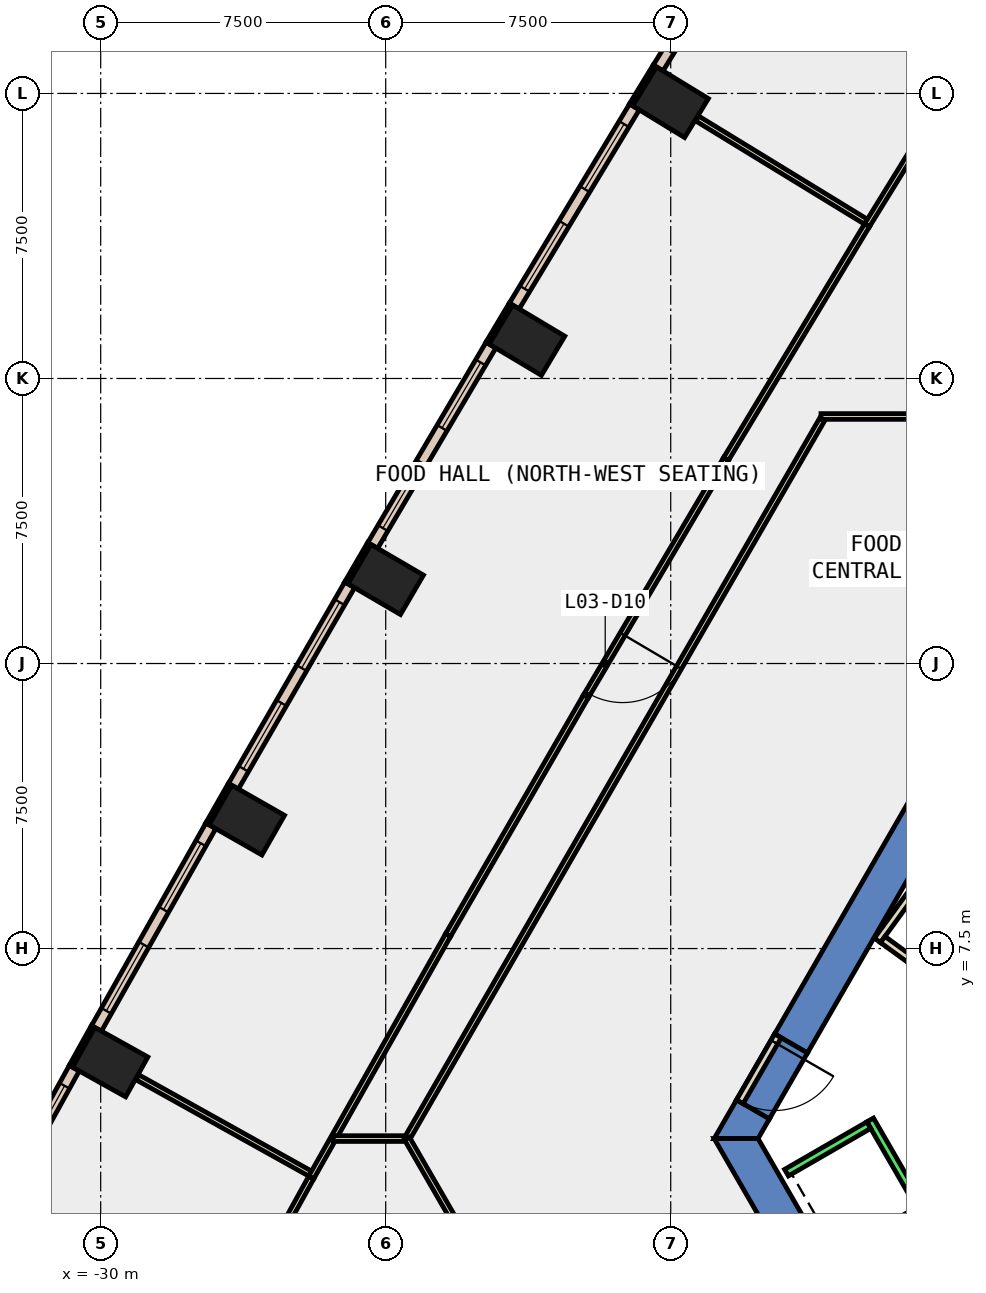
"""IFC4 building model, lengths in metres.
Left out: names, types, materials, properties, quantities, classifications, styles, units other than length and angle.
Written with IfcOpenShell. Run it as: python <this file> out.ifc"""

import sys

from ifc_helpers import new_model, si_unit, direction, frame, frame_2d, origin, origin_2d, place, context, subcontext, project, spatial, polyline, rectangle, outline, extrude, element, fill, save


model = new_model("IFC4")
c1 = context("Model", 3, precision=1e-05, world=origin(), true_north=direction((0.0, 1.0)))
c2 = subcontext(c1, "Body", "Model", "MODEL_VIEW")
j1 = project(units=[si_unit("LENGTHUNIT", "METRE"), si_unit("PLANEANGLEUNIT", "RADIAN")], contexts=[c1])
p1 = place(None, origin())
s1 = spatial("IfcSite", under=j1, at=p1, CompositionType="ELEMENT")
p2 = place(p1, origin())
s2 = spatial("IfcBuilding", under=s1, at=p2, CompositionType="ELEMENT")
p3 = place(p2, frame((0.0, 0.0, 20.0)))
s3 = spatial("IfcBuildingStorey", under=s2, at=p3, CompositionType="ELEMENT", Elevation=20.0)
for number, where, z_axis, x_axis in (
    (1, (-15.005, 29.769, -0.45), (0.0, 0.0, 1.0), (0.522, 0.853, 0.0)),
    (2, (-18.782, 23.508, -0.45), (0.0, 0.0, 1.0), (0.513, 0.858, 0.0)),
    (3, (-22.5, 17.211, -0.45), (0.0, 0.0, 1.0), (0.504, 0.864, 0.0)),
    (4, (-26.155, 10.88, -0.45), (0.0, 0.0, 1.0), (0.496, 0.869, 0.0)),
    (5, (-29.75, 4.512, -0.45), (0.0, 0.0, 1.0), (0.487, 0.873, 0.0)),
):
    element("IfcColumn", number, at=place(p3, frame(where, z_axis=z_axis, x_axis=x_axis)), inside=s3, PredefinedType="COLUMN", context=c2, shape_type="SweptSolid", body=[
        extrude(rectangle(XDim=1.2, YDim=1.6, at=origin_2d()), origin(), (0.0, 0.0, 1.0), 5.0),
    ])
p4 = place(p3, frame((0.0, 0.0, -0.45)))
e6 = element("IfcWall", 6, at=p4, inside=s3, PredefinedType="SHEAR", context=c2, shape_type="SweptSolid", body=[
    extrude(outline(polyline([(-12.267, 5.252), (-11.402, 4.752), (-6.351, 13.5), (-6.928, 14.5), (-12.267, 5.252)])), origin(), (0.0, 0.0, 1.0), 5.0),
])
p5 = place(p3, frame((0.0, 0.0, -0.45)))
e7 = element("IfcWall", 7, at=p5, inside=s3, PredefinedType="SHEAR", context=c2, shape_type="SweptSolid", body=[
    extrude(outline(polyline([(-12.402, 3.02), (-13.267, 3.52), (-13.856, 2.5), (-12.702, 2.5), (-12.402, 3.02)])), origin(), (0.0, 0.0, 1.0), 5.0),
])
p6 = place(p3, frame((0.0, 0.0, 3.6)))
e8 = element("IfcWall", 8, at=p6, inside=s3, PredefinedType="SHEAR", context=c2, shape_type="SweptSolid", body=[
    extrude(outline(polyline([(-13.267, 3.52), (-12.402, 3.02), (-11.402, 4.752), (-12.267, 5.252), (-13.267, 3.52)])), origin(), (0.0, 0.0, 1.0), 0.95),
])
p7 = place(p3, frame((0.0, 0.0, -0.45)))
e9 = element("IfcWall", 9, at=p7, inside=s3, PredefinedType="SHEAR", context=c2, shape_type="SweptSolid", body=[
    extrude(outline(polyline([(-13.856, 2.5), (-6.928, -9.5), (-6.351, -8.5), (-12.702, 2.5), (-13.856, 2.5)])), origin(), (0.0, 0.0, 1.0), 5.0),
])
p8 = place(p3, frame((-15.417, 30.724, 0.0), z_axis=(0.0, 0.0, 1.0), x_axis=(-0.521507599072, -0.853246637327, 0.0)))
e10 = element("IfcWall", 10, at=p8, inside=s3, PredefinedType="STANDARD", context=c2, shape_type="SweptSolid", body=[
    extrude(rectangle(XDim=1.2, YDim=0.1, at=frame_2d((0.6, 0.0))), origin(), (0.0, 0.0, 1.0), 4.55),
])
p9 = place(p3, frame((-19.204, 24.459, 0.0), z_axis=(0.0, 0.0, 1.0), x_axis=(-0.513238760752, -0.858245870635, 0.0)))
e11 = element("IfcWall", 11, at=p9, inside=s3, PredefinedType="STANDARD", context=c2, shape_type="SweptSolid", body=[
    extrude(rectangle(XDim=1.2, YDim=0.1, at=frame_2d((0.6, 0.0))), origin(), (0.0, 0.0, 1.0), 4.55),
])
p10 = place(p3, frame((-22.931, 18.158, 0.0), z_axis=(0.0, 0.0, 1.0), x_axis=(-0.504313844903, -0.863520437418, 0.0)))
e12 = element("IfcWall", 12, at=p10, inside=s3, PredefinedType="STANDARD", context=c2, shape_type="SweptSolid", body=[
    extrude(rectangle(XDim=1.2, YDim=0.1, at=frame_2d((0.6, 0.0))), origin(), (0.0, 0.0, 1.0), 4.55),
])
p11 = place(p3, frame((-26.596, 11.822, 0.0), z_axis=(0.0, 0.0, 1.0), x_axis=(-0.495854054996, -0.868405870629, 0.0)))
e13 = element("IfcWall", 13, at=p11, inside=s3, PredefinedType="STANDARD", context=c2, shape_type="SweptSolid", body=[
    extrude(rectangle(XDim=1.2, YDim=0.1, at=frame_2d((0.6, 0.0))), origin(), (0.0, 0.0, 1.0), 4.55),
])
p12 = place(p3, frame((-30.2, 5.45, 0.0), z_axis=(0.0, 0.0, 1.0), x_axis=(-0.486817526853, -0.873503689488, 0.0)))
e14 = element("IfcWall", 14, at=p12, inside=s3, PredefinedType="STANDARD", context=c2, shape_type="SweptSolid", body=[
    extrude(rectangle(XDim=1.2, YDim=0.1, at=frame_2d((0.6, 0.0))), origin(), (0.0, 0.0, 1.0), 4.55),
])
p13 = place(p3, frame((-12.117, 35.881, 0.0), z_axis=(0.0, 0.0, 1.0), x_axis=(-0.524953701886, -0.85113078365, 0.0)))
e15 = element("IfcWall", 15, at=p13, inside=s3, PredefinedType="STANDARD", context=c2, shape_type="SweptSolid", body=[
    extrude(rectangle(XDim=6.123, YDim=0.3, at=frame_2d((3.061, 0.0))), origin(), (0.0, 0.0, 1.0), 4.55),
])
p14 = place(p13, frame((0.531, 0.0, 1.0)))
e16 = element("IfcOpeningElement", 16, at=p14, cuts=e15, PredefinedType="OPENING", context=c2, shape_type="SweptSolid", body=[
    extrude(rectangle(XDim=2.0, YDim=3.2, at=frame_2d((1.0, 1.6))), frame((0.0, 0.16, 0.0), z_axis=(0.0, -1.0, 0.0), x_axis=(1.0, 0.0, 0.0)), (0.0, 0.0, 1.0), 0.32),
])
p15 = place(p13, frame((3.592, 0.0, 1.0)))
e17 = element("IfcOpeningElement", 17, at=p15, cuts=e15, PredefinedType="OPENING", context=c2, shape_type="SweptSolid", body=[
    extrude(rectangle(XDim=2.0, YDim=3.2, at=frame_2d((1.0, 1.6))), frame((0.0, 0.16, 0.0), z_axis=(0.0, -1.0, 0.0), x_axis=(1.0, 0.0, 0.0)), (0.0, 0.0, 1.0), 0.32),
])
p16 = place(p3, frame((-15.954, 29.647, 0.0), z_axis=(0.0, 0.0, 1.0), x_axis=(-0.516687651362, -0.85617397235, 0.0)))
e18 = element("IfcWall", 18, at=p16, inside=s3, PredefinedType="STANDARD", context=c2, shape_type="SweptSolid", body=[
    extrude(rectangle(XDim=6.121, YDim=0.3, at=frame_2d((3.061, 0.0))), origin(), (0.0, 0.0, 1.0), 4.55),
])
p17 = place(p16, frame((0.53, 0.0, 1.0)))
e19 = element("IfcOpeningElement", 19, at=p17, cuts=e18, PredefinedType="OPENING", context=c2, shape_type="SweptSolid", body=[
    extrude(rectangle(XDim=2.0, YDim=3.2, at=frame_2d((1.0, 1.6))), frame((0.0, 0.16, 0.0), z_axis=(0.0, -1.0, 0.0), x_axis=(1.0, 0.0, 0.0)), (0.0, 0.0, 1.0), 0.32),
])
p18 = place(p16, frame((3.591, 0.0, 1.0)))
e20 = element("IfcOpeningElement", 20, at=p18, cuts=e18, PredefinedType="OPENING", context=c2, shape_type="SweptSolid", body=[
    extrude(rectangle(XDim=2.0, YDim=3.2, at=frame_2d((1.0, 1.6))), frame((0.0, 0.16, 0.0), z_axis=(0.0, -1.0, 0.0), x_axis=(1.0, 0.0, 0.0)), (0.0, 0.0, 1.0), 0.32),
])
p19 = place(p3, frame((-19.731, 23.377, 0.0), z_axis=(0.0, 0.0, 1.0), x_axis=(-0.50834231483, -0.861155091115, 0.0)))
e21 = element("IfcWall", 21, at=p19, inside=s3, PredefinedType="STANDARD", context=c2, shape_type="SweptSolid", body=[
    extrude(rectangle(XDim=6.122, YDim=0.3, at=frame_2d((3.061, 0.0))), origin(), (0.0, 0.0, 1.0), 4.55),
])
p20 = place(p19, frame((0.53, 0.0, 1.0)))
e22 = element("IfcOpeningElement", 22, at=p20, cuts=e21, PredefinedType="OPENING", context=c2, shape_type="SweptSolid", body=[
    extrude(rectangle(XDim=2.0, YDim=3.2, at=frame_2d((1.0, 1.6))), frame((0.0, 0.16, 0.0), z_axis=(0.0, -1.0, 0.0), x_axis=(1.0, 0.0, 0.0)), (0.0, 0.0, 1.0), 0.32),
])
p21 = place(p19, frame((3.591, 0.0, 1.0)))
e23 = element("IfcOpeningElement", 23, at=p21, cuts=e21, PredefinedType="OPENING", context=c2, shape_type="SweptSolid", body=[
    extrude(rectangle(XDim=2.0, YDim=3.2, at=frame_2d((1.0, 1.6))), frame((0.0, 0.16, 0.0), z_axis=(0.0, -1.0, 0.0), x_axis=(1.0, 0.0, 0.0)), (0.0, 0.0, 1.0), 0.32),
])
p22 = place(p3, frame((-23.447, 17.071, 0.0), z_axis=(0.0, 0.0, 1.0), x_axis=(-0.499939977436, -0.866060055055, 0.0)))
e24 = element("IfcWall", 24, at=p22, inside=s3, PredefinedType="STANDARD", context=c2, shape_type="SweptSolid", body=[
    extrude(rectangle(XDim=6.121, YDim=0.3, at=frame_2d((3.061, 0.0))), origin(), (0.0, 0.0, 1.0), 4.55),
])
p23 = place(p22, frame((0.53, 0.0, 1.0)))
e25 = element("IfcOpeningElement", 25, at=p23, cuts=e24, PredefinedType="OPENING", context=c2, shape_type="SweptSolid", body=[
    extrude(rectangle(XDim=2.0, YDim=3.2, at=frame_2d((1.0, 1.6))), frame((0.0, 0.16, 0.0), z_axis=(0.0, -1.0, 0.0), x_axis=(1.0, 0.0, 0.0)), (0.0, 0.0, 1.0), 0.32),
])
p24 = place(p22, frame((3.591, 0.0, 1.0)))
e26 = element("IfcOpeningElement", 26, at=p24, cuts=e24, PredefinedType="OPENING", context=c2, shape_type="SweptSolid", body=[
    extrude(rectangle(XDim=2.0, YDim=3.2, at=frame_2d((1.0, 1.6))), frame((0.0, 0.16, 0.0), z_axis=(0.0, -1.0, 0.0), x_axis=(1.0, 0.0, 0.0)), (0.0, 0.0, 1.0), 0.32),
])
p25 = place(p3, frame((-27.101, 10.73, 0.0), z_axis=(0.0, 0.0, 1.0), x_axis=(-0.491661677717, -0.870786308267, 0.0)))
e27 = element("IfcWall", 27, at=p25, inside=s3, PredefinedType="STANDARD", context=c2, shape_type="SweptSolid", body=[
    extrude(rectangle(XDim=6.122, YDim=0.3, at=frame_2d((3.061, 0.0))), origin(), (0.0, 0.0, 1.0), 4.55),
])
p26 = place(p25, frame((0.531, 0.0, 1.0)))
e28 = element("IfcOpeningElement", 28, at=p26, cuts=e27, PredefinedType="OPENING", context=c2, shape_type="SweptSolid", body=[
    extrude(rectangle(XDim=2.0, YDim=3.2, at=frame_2d((1.0, 1.6))), frame((0.0, 0.16, 0.0), z_axis=(0.0, -1.0, 0.0), x_axis=(1.0, 0.0, 0.0)), (0.0, 0.0, 1.0), 0.32),
])
p27 = place(p25, frame((3.592, 0.0, 1.0)))
e29 = element("IfcOpeningElement", 29, at=p27, cuts=e27, PredefinedType="OPENING", context=c2, shape_type="SweptSolid", body=[
    extrude(rectangle(XDim=2.0, YDim=3.2, at=frame_2d((1.0, 1.6))), frame((0.0, 0.16, 0.0), z_axis=(0.0, -1.0, 0.0), x_axis=(1.0, 0.0, 0.0)), (0.0, 0.0, 1.0), 0.32),
])
p28 = place(p3, frame((-30.694, 4.353, 0.0), z_axis=(0.0, 0.0, 1.0), x_axis=(-0.483233380559, -0.875491576152, 0.0)))
e30 = element("IfcWall", 30, at=p28, inside=s3, PredefinedType="STANDARD", context=c2, shape_type="SweptSolid", body=[
    extrude(rectangle(XDim=6.121, YDim=0.3, at=frame_2d((3.061, 0.0))), origin(), (0.0, 0.0, 1.0), 4.55),
])
p29 = place(p28, frame((0.53, 0.0, 1.0)))
e31 = element("IfcOpeningElement", 31, at=p29, cuts=e30, PredefinedType="OPENING", context=c2, shape_type="SweptSolid", body=[
    extrude(rectangle(XDim=2.0, YDim=3.2, at=frame_2d((1.0, 1.6))), frame((0.0, 0.16, 0.0), z_axis=(0.0, -1.0, 0.0), x_axis=(1.0, 0.0, 0.0)), (0.0, 0.0, 1.0), 0.32),
])
p30 = place(p28, frame((3.591, 0.0, 1.0)))
e32 = element("IfcOpeningElement", 32, at=p30, cuts=e30, PredefinedType="OPENING", context=c2, shape_type="SweptSolid", body=[
    extrude(rectangle(XDim=2.0, YDim=3.2, at=frame_2d((1.0, 1.6))), frame((0.0, 0.16, 0.0), z_axis=(0.0, -1.0, 0.0), x_axis=(1.0, 0.0, 0.0)), (0.0, 0.0, 1.0), 0.32),
])
p31 = place(p3, frame((-7.915, 9.981, 0.0), z_axis=(0.0, 0.0, 1.0), x_axis=(-0.587497525331, -0.809225962096, 0.0)))
e33 = element("IfcWall", 33, at=p31, inside=s3, PredefinedType="PARTITIONING", context=c2, shape_type="SweptSolid", body=[
    extrude(rectangle(XDim=2.8, YDim=0.2, at=frame_2d((1.4, 0.0))), origin(), (0.0, 0.0, 1.0), 4.55),
])
p32 = place(p3, frame((-9.421, 7.738, 0.0), z_axis=(0.0, 0.0, 1.0), x_axis=(0.808832031072, -0.588039748242, 0.0)))
e34 = element("IfcWall", 34, at=p32, inside=s3, PredefinedType="PARTITIONING", context=c2, shape_type="SweptSolid", body=[
    extrude(rectangle(XDim=2.2, YDim=0.2, at=frame_2d((1.1, 0.0))), origin(), (0.0, 0.0, 1.0), 4.55),
])
p33 = place(p3, frame((-9.801, 26.587, 0.0), z_axis=(0.0, 0.0, 1.0), x_axis=(-0.853133190526, 0.521693165781, 0.0)))
e35 = element("IfcWall", 35, at=p33, inside=s3, PredefinedType="PARTITIONING", context=c2, shape_type="SweptSolid", body=[
    extrude(rectangle(XDim=5.279, YDim=0.15, at=frame_2d((2.64, 0.0))), origin(), (0.0, 0.0, 1.0), 4.55),
])
p34 = place(p3, frame((-5.99, 32.767, 0.0), z_axis=(0.0, 0.0, 1.0), x_axis=(-0.524805430661, -0.851222215376, 0.0)))
e36 = element("IfcWall", 36, at=p34, inside=s3, PredefinedType="PARTITIONING", context=c2, shape_type="SweptSolid", body=[
    extrude(rectangle(XDim=7.328, YDim=0.15, at=frame_2d((3.664, 0.0))), origin(), (0.0, 0.0, 1.0), 4.55),
])
p35 = place(p3, frame((-24.422, 1.542, 0.0), z_axis=(0.0, 0.0, 1.0), x_axis=(-0.873438758077, 0.48693401595, 0.0)))
e37 = element("IfcWall", 37, at=p35, inside=s3, PredefinedType="PARTITIONING", context=c2, shape_type="SweptSolid", body=[
    extrude(rectangle(XDim=5.28, YDim=0.15, at=frame_2d((2.64, 0.0))), origin(), (0.0, 0.0, 1.0), 4.55),
])
p36 = place(p3, frame((-9.836, 26.529, 0.0), z_axis=(0.0, 0.0, 1.0), x_axis=(-0.516524835149, -0.856272208281, 0.0)))
e38 = element("IfcWall", 38, at=p36, inside=s3, PredefinedType="PARTITIONING", context=c2, shape_type="SweptSolid", body=[
    extrude(rectangle(XDim=7.179, YDim=0.15, at=frame_2d((3.589, 0.0))), origin(), (0.0, 0.0, 1.0), 4.55),
])
p37 = place(p3, frame((-13.544, 20.382, 0.0), z_axis=(0.0, 0.0, 1.0), x_axis=(-0.508434454558, -0.861100694122, 0.0)))
e39 = element("IfcWall", 39, at=p37, inside=s3, PredefinedType="PARTITIONING", context=c2, shape_type="SweptSolid", body=[
    extrude(rectangle(XDim=7.254, YDim=0.15, at=frame_2d((3.627, 0.0))), origin(), (0.0, 0.0, 1.0), 4.55),
])
p38 = place(p37, frame((5.354, 0.0, 0.0)))
e40 = element("IfcOpeningElement", 40, at=p38, cuts=e39, PredefinedType="OPENING", context=c2, shape_type="SweptSolid", body=[
    extrude(rectangle(XDim=1.8, YDim=2.1, at=frame_2d((0.9, 1.05))), frame((0.0, 0.085, 0.0), z_axis=(0.0, -1.0, 0.0), x_axis=(1.0, 0.0, 0.0)), (0.0, 0.0, 1.0), 0.17),
])
p39 = place(p3, frame((-17.232, 14.136, 0.0), z_axis=(0.0, 0.0, 1.0), x_axis=(-0.499962371685, -0.866047127413, 0.0)))
e41 = element("IfcWall", 41, at=p39, inside=s3, PredefinedType="PARTITIONING", context=c2, shape_type="SweptSolid", body=[
    extrude(rectangle(XDim=7.252, YDim=0.15, at=frame_2d((3.626, 0.0))), origin(), (0.0, 0.0, 1.0), 4.55),
])
p40 = place(p3, frame((-20.858, 7.855, 0.0), z_axis=(0.0, 0.0, 1.0), x_axis=(-0.491659598838, -0.870787482036, 0.0)))
e42 = element("IfcWall", 42, at=p40, inside=s3, PredefinedType="PARTITIONING", context=c2, shape_type="SweptSolid", body=[
    extrude(rectangle(XDim=7.324, YDim=0.15, at=frame_2d((3.662, 0.0))), origin(), (0.0, 0.0, 1.0), 4.55),
])
p41 = place(p3, frame((-24.458, 1.477, 0.0), z_axis=(0.0, 0.0, 1.0), x_axis=(-0.483150131412, -0.875537520907, 0.0)))
e43 = element("IfcWall", 43, at=p41, inside=s3, PredefinedType="PARTITIONING", context=c2, shape_type="SweptSolid", body=[
    extrude(rectangle(XDim=7.182, YDim=0.15, at=frame_2d((3.591, 0.0))), origin(), (0.0, 0.0, 1.0), 4.55),
])
p42 = place(p3, frame((-21.976, 2.435, 0.0), z_axis=(0.0, 0.0, 1.0), x_axis=(0.499977403953, 0.866038449225, 0.0)))
e44 = element("IfcWall", 44, at=p42, inside=s3, PredefinedType="PARTITIONING", context=c2, shape_type="SweptSolid", body=[
    extrude(rectangle(XDim=21.939, YDim=0.15, at=frame_2d((10.969, 0.0))), origin(), (0.0, 0.0, 1.0), 4.55),
])
p43 = place(p3, frame((-11.045, 21.5, 0.0), z_axis=(0.0, 0.0, 1.0), x_axis=(1.0, 0.0, 0.0)))
e45 = element("IfcWall", 45, at=p43, inside=s3, PredefinedType="PARTITIONING", context=c2, shape_type="SweptSolid", body=[
    extrude(rectangle(XDim=10.645, YDim=0.15, at=frame_2d((5.323, 0.0))), origin(), (0.0, 0.0, 1.0), 4.55),
])
p44 = place(p3, frame((-23.881, 2.5, 0.0), z_axis=(0.0, 0.0, 1.0), x_axis=(1.0, 0.0, 0.0)))
e46 = element("IfcWall", 46, at=p44, inside=s3, PredefinedType="PARTITIONING", context=c2, shape_type="SweptSolid", body=[
    extrude(rectangle(XDim=1.867, YDim=0.15, at=frame_2d((0.934, 0.0))), origin(), (0.0, 0.0, 1.0), 4.55),
])
p45 = place(p3, frame((-12.18, 5.202, 0.0), z_axis=(0.0, 0.0, 1.0), x_axis=(-0.50002537861, -0.866010750942, 0.0)))
e47 = element("IfcWall", 47, at=p45, inside=s3, PredefinedType="PARTITIONING", context=c2, shape_type="SweptSolid", body=[
    extrude(rectangle(XDim=2.0, YDim=0.2, at=frame_2d((1.0, 0.0))), origin(), (0.0, 0.0, 1.0), 2.4),
])
p46 = place(p45, frame((0.19, 0.0, 0.0)))
e48 = element("IfcOpeningElement", 48, at=p46, cuts=e47, PredefinedType="OPENING", context=c2, shape_type="SweptSolid", body=[
    extrude(rectangle(XDim=1.8, YDim=2.1, at=frame_2d((0.9, 1.05))), frame((0.0, 0.11, 0.0), z_axis=(0.0, -1.0, 0.0), x_axis=(1.0, 0.0, 0.0)), (0.0, 0.0, 1.0), 0.22),
])
p47 = place(p3, frame((-15.572, -8.529, 0.0), z_axis=(0.0, 0.0, 1.0), x_axis=(-0.499959763273, 0.866048633224, 0.0)))
e49 = element("IfcWall", 49, at=p47, inside=s3, PredefinedType="PARTITIONING", context=c2, shape_type="SweptSolid", body=[
    extrude(rectangle(XDim=12.735, YDim=0.15, at=frame_2d((6.367, 0.0))), origin(), (0.0, 0.0, 1.0), 4.55),
])
p48 = place(p3, frame((-9.751, 2.99, 0.0), z_axis=(0.0, 0.0, 1.0), x_axis=(0.50000090737, -0.866024879913, 0.0)))
e50 = element("IfcWall", 50, at=p48, inside=s3, PredefinedType="STANDARD", context=c2, shape_type="SweptSolid", body=[
    extrude(rectangle(XDim=10.6, YDim=0.2, at=frame_2d((5.3, 0.0))), origin(), (0.0, 0.0, 1.0), 4.55),
])
p49 = place(p3, frame((-9.788, 2.853, 0.0), z_axis=(0.0, 0.0, 1.0), x_axis=(-0.865998541277, -0.500046524342, 0.0)))
e51 = element("IfcWall", 51, at=p49, inside=s3, PredefinedType="STANDARD", context=c2, shape_type="SweptSolid", body=[
    extrude(rectangle(XDim=2.5, YDim=0.2, at=frame_2d((1.25, 0.0))), origin(), (0.0, 0.0, 1.0), 4.55),
])
p50 = place(p3, frame((-8.488, 0.602, 0.0), z_axis=(0.0, 0.0, 1.0), x_axis=(-0.866022959057, -0.500004234368, 0.0)))
e52 = element("IfcWall", 52, at=p50, inside=s3, PredefinedType="STANDARD", context=c2, shape_type="SweptSolid", body=[
    extrude(rectangle(XDim=2.5, YDim=0.2, at=frame_2d((1.25, 0.0))), origin(), (0.0, 0.0, 1.0), 4.55),
])
p51 = place(p17, origin())
e53 = element("IfcWindow", 53, at=p51, inside=s3, PartitioningType="SINGLE_PANEL", PredefinedType="WINDOW", context=c2, shape_type="SweptSolid", body=[
    extrude(rectangle(XDim=2.0, YDim=3.2, at=frame_2d((1.0, 1.6))), frame((0.0, 0.03, 0.0), z_axis=(0.0, -1.0, 0.0), x_axis=(1.0, 0.0, 0.0)), (0.0, 0.0, 1.0), 0.06),
])
fill(e19, e53)
p52 = place(p18, origin())
e54 = element("IfcWindow", 54, at=p52, inside=s3, PartitioningType="SINGLE_PANEL", PredefinedType="WINDOW", context=c2, shape_type="SweptSolid", body=[
    extrude(rectangle(XDim=2.0, YDim=3.2, at=frame_2d((1.0, 1.6))), frame((0.0, 0.03, 0.0), z_axis=(0.0, -1.0, 0.0), x_axis=(1.0, 0.0, 0.0)), (0.0, 0.0, 1.0), 0.06),
])
fill(e20, e54)
p53 = place(p20, origin())
e55 = element("IfcWindow", 55, at=p53, inside=s3, PartitioningType="SINGLE_PANEL", PredefinedType="WINDOW", context=c2, shape_type="SweptSolid", body=[
    extrude(rectangle(XDim=2.0, YDim=3.2, at=frame_2d((1.0, 1.6))), frame((0.0, 0.03, 0.0), z_axis=(0.0, -1.0, 0.0), x_axis=(1.0, 0.0, 0.0)), (0.0, 0.0, 1.0), 0.06),
])
fill(e22, e55)
p54 = place(p21, origin())
e56 = element("IfcWindow", 56, at=p54, inside=s3, PartitioningType="SINGLE_PANEL", PredefinedType="WINDOW", context=c2, shape_type="SweptSolid", body=[
    extrude(rectangle(XDim=2.0, YDim=3.2, at=frame_2d((1.0, 1.6))), frame((0.0, 0.03, 0.0), z_axis=(0.0, -1.0, 0.0), x_axis=(1.0, 0.0, 0.0)), (0.0, 0.0, 1.0), 0.06),
])
fill(e23, e56)
p55 = place(p23, origin())
e57 = element("IfcWindow", 57, at=p55, inside=s3, PartitioningType="SINGLE_PANEL", PredefinedType="WINDOW", context=c2, shape_type="SweptSolid", body=[
    extrude(rectangle(XDim=2.0, YDim=3.2, at=frame_2d((1.0, 1.6))), frame((0.0, 0.03, 0.0), z_axis=(0.0, -1.0, 0.0), x_axis=(1.0, 0.0, 0.0)), (0.0, 0.0, 1.0), 0.06),
])
fill(e25, e57)
p56 = place(p24, origin())
e58 = element("IfcWindow", 58, at=p56, inside=s3, PartitioningType="SINGLE_PANEL", PredefinedType="WINDOW", context=c2, shape_type="SweptSolid", body=[
    extrude(rectangle(XDim=2.0, YDim=3.2, at=frame_2d((1.0, 1.6))), frame((0.0, 0.03, 0.0), z_axis=(0.0, -1.0, 0.0), x_axis=(1.0, 0.0, 0.0)), (0.0, 0.0, 1.0), 0.06),
])
fill(e26, e58)
p57 = place(p26, origin())
e59 = element("IfcWindow", 59, at=p57, inside=s3, PartitioningType="SINGLE_PANEL", PredefinedType="WINDOW", context=c2, shape_type="SweptSolid", body=[
    extrude(rectangle(XDim=2.0, YDim=3.2, at=frame_2d((1.0, 1.6))), frame((0.0, 0.03, 0.0), z_axis=(0.0, -1.0, 0.0), x_axis=(1.0, 0.0, 0.0)), (0.0, 0.0, 1.0), 0.06),
])
fill(e28, e59)
p58 = place(p27, origin())
e60 = element("IfcWindow", 60, at=p58, inside=s3, PartitioningType="SINGLE_PANEL", PredefinedType="WINDOW", context=c2, shape_type="SweptSolid", body=[
    extrude(rectangle(XDim=2.0, YDim=3.2, at=frame_2d((1.0, 1.6))), frame((0.0, 0.03, 0.0), z_axis=(0.0, -1.0, 0.0), x_axis=(1.0, 0.0, 0.0)), (0.0, 0.0, 1.0), 0.06),
])
fill(e29, e60)
p59 = place(p29, origin())
e61 = element("IfcWindow", 61, at=p59, inside=s3, PartitioningType="SINGLE_PANEL", PredefinedType="WINDOW", context=c2, shape_type="SweptSolid", body=[
    extrude(rectangle(XDim=2.0, YDim=3.2, at=frame_2d((1.0, 1.6))), frame((0.0, 0.03, 0.0), z_axis=(0.0, -1.0, 0.0), x_axis=(1.0, 0.0, 0.0)), (0.0, 0.0, 1.0), 0.06),
])
fill(e31, e61)
p60 = place(p38, origin())
e62 = element("IfcDoor", 62, at=p60, inside=s3, OperationType="DOUBLE_DOOR_SINGLE_SWING", PredefinedType="DOOR", context=c2, shape_type="SweptSolid", body=[
    extrude(rectangle(XDim=1.8, YDim=2.1, at=frame_2d((0.9, 1.05))), frame((0.0, 0.025, 0.0), z_axis=(0.0, -1.0, 0.0), x_axis=(1.0, 0.0, 0.0)), (0.0, 0.0, 1.0), 0.05),
])
fill(e40, e62)
p61 = place(p46, origin())
e63 = element("IfcDoor", 63, at=p61, inside=s3, OperationType="DOUBLE_DOOR_SINGLE_SWING", PredefinedType="DOOR", context=c2, shape_type="SweptSolid", body=[
    extrude(rectangle(XDim=1.8, YDim=2.1, at=frame_2d((0.9, 1.05))), frame((0.0, 0.025, 0.0), z_axis=(0.0, -1.0, 0.0), x_axis=(1.0, 0.0, 0.0)), (0.0, 0.0, 1.0), 0.05),
])
fill(e48, e63)
save(model, sys.argv[1])
